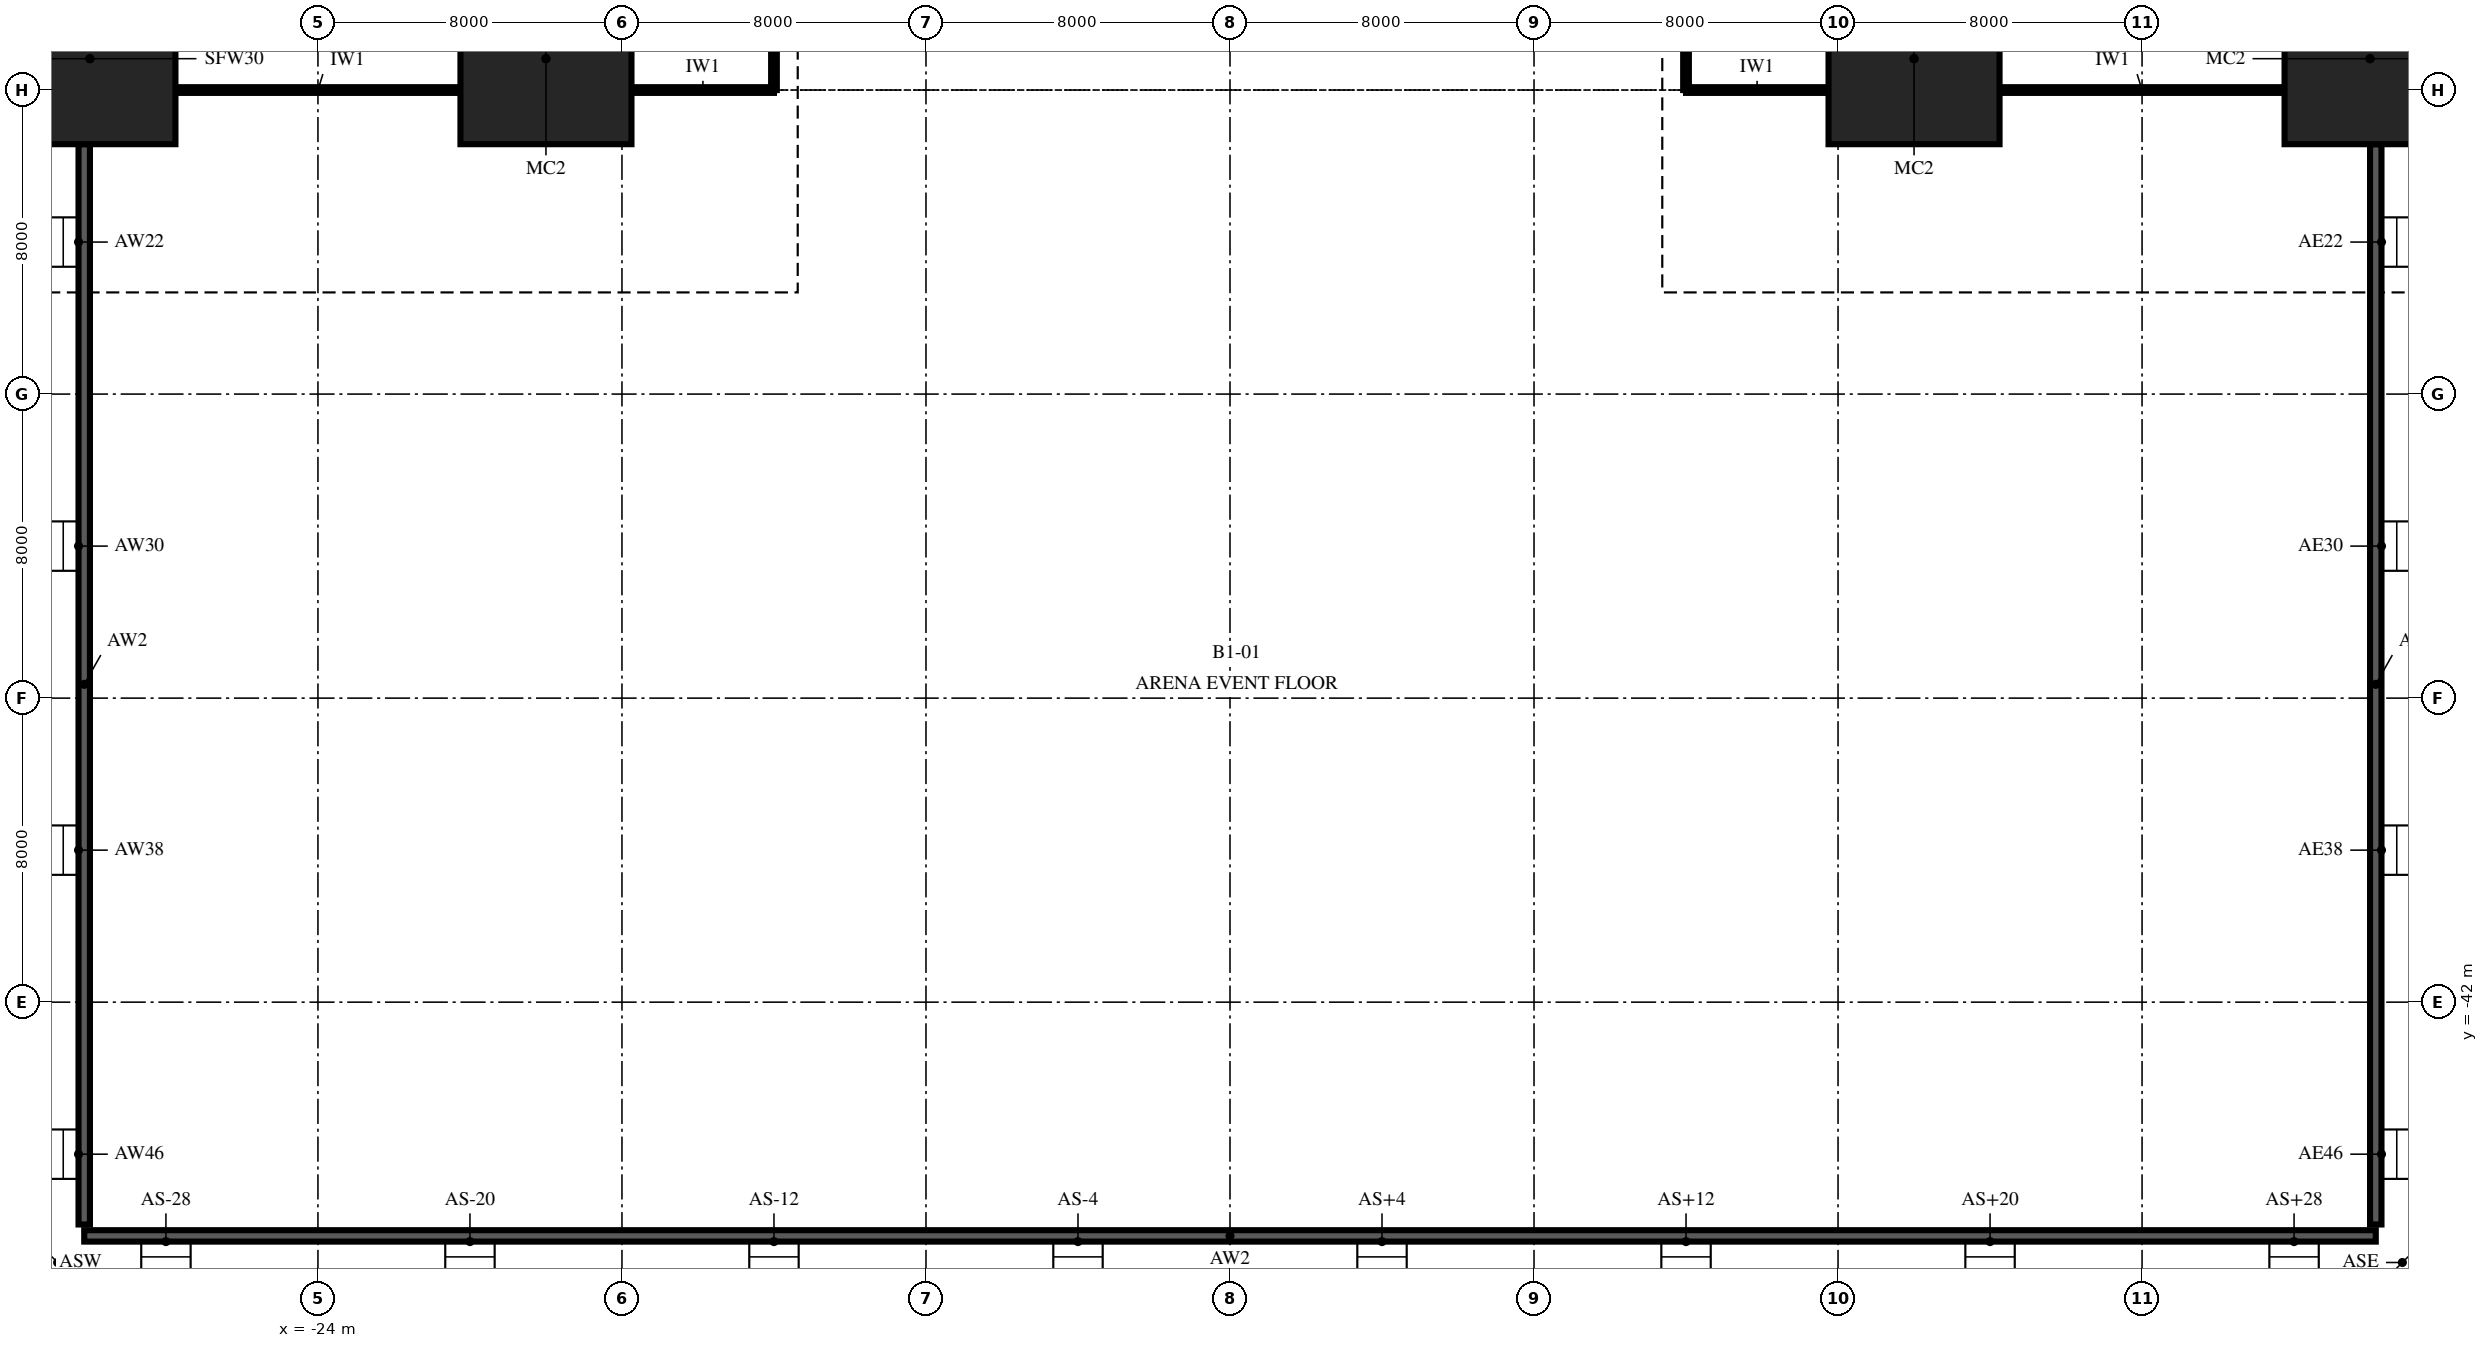
"""IFC4 building model, lengths in metres.
Left out: names, types, materials, properties, quantities, classifications, styles, units other than length and angle.
Written with IfcOpenShell. Run it as: python <this file> out.ifc"""

import sys

from ifc_helpers import new_model, si_unit, direction, frame, frame_2d, origin, origin_2d, place, context, subcontext, project, spatial, rectangle, extrude, element, save


model = new_model("IFC4")
c1 = context("Model", 3, precision=1e-05, world=origin(), true_north=direction((0.0, 1.0)))
c2 = subcontext(c1, "Body", "Model", "MODEL_VIEW")
j1 = project(units=[si_unit("LENGTHUNIT", "METRE"), si_unit("PLANEANGLEUNIT", "RADIAN")], contexts=[c1])
p1 = place(None, origin())
s1 = spatial("IfcSite", under=j1, at=p1, CompositionType="ELEMENT")
p2 = place(p1, origin())
s2 = spatial("IfcBuilding", under=s1, at=p2, CompositionType="ELEMENT")
p3 = place(p2, frame((0.0, 0.0, -7.0)))
s3 = spatial("IfcBuildingStorey", under=s2, at=p3, CompositionType="ELEMENT", Elevation=-7.0)
for number, where, z_axis, x_axis in (
    (1, (-30.0, -17.175, -0.6), (0.0, 0.0, 1.0), (1.0, 0.0, 0.0)),
    (2, (-18.0, -17.175, -0.6), (0.0, 0.0, 1.0), (1.0, 0.0, 0.0)),
    (3, (18.0, -17.175, -0.6), (0.0, 0.0, 1.0), (1.0, 0.0, 0.0)),
    (4, (30.0, -17.175, -0.6), (0.0, 0.0, 1.0), (1.0, 0.0, 0.0)),
):
    element("IfcColumn", number, at=place(p3, frame(where, z_axis=z_axis, x_axis=x_axis)), inside=s3, PredefinedType="COLUMN", context=c2, shape_type="SweptSolid", body=[
        extrude(rectangle(XDim=4.5, YDim=4.5, at=origin_2d()), origin(), (0.0, 0.0, 1.0), 7.6),
    ])
p4 = place(p3, frame((-30.15, -48.15, 0.0), z_axis=(0.0, 0.0, 1.0), x_axis=(1.0, 0.0, 0.0)))
e5 = element("IfcWall", 5, at=p4, inside=s3, PredefinedType="SHEAR", context=c2, shape_type="SweptSolid", body=[
    extrude(rectangle(XDim=60.3, YDim=0.3, at=frame_2d((30.15, 0.0))), origin(), (0.0, 0.0, 1.0), 1.1),
])
for number, where, z_axis, x_axis in (
    (6, (30.15, -47.85, 0.0), (0.0, 0.0, 1.0), (0.0, 1.0, 0.0)),
    (7, (-30.15, -19.425, 0.0), (0.0, 0.0, 1.0), (0.0, -1.0, 0.0)),
):
    element("IfcWall", number, at=place(p3, frame(where, z_axis=z_axis, x_axis=x_axis)), inside=s3, PredefinedType="SHEAR", context=c2, shape_type="SweptSolid", body=[
        extrude(rectangle(XDim=28.425, YDim=0.3, at=frame_2d((14.212, 0.0))), origin(), (0.0, 0.0, 1.0), 1.1),
    ])
p5 = place(p3, frame((-12.0, -18.0, 0.0), z_axis=(0.0, 0.0, 1.0), x_axis=(0.0, 1.0, 0.0)))
e8 = element("IfcWall", 8, at=p5, inside=s3, PredefinedType="PARTITIONING", context=c2, shape_type="SweptSolid", body=[
    extrude(rectangle(XDim=11.6, YDim=0.15, at=frame_2d((5.8, 0.0))), origin(), (0.0, 0.0, 1.0), 6.7),
])
p6 = place(p3, frame((12.0, -18.0, 0.0), z_axis=(0.0, 0.0, 1.0), x_axis=(0.0, 1.0, 0.0)))
e9 = element("IfcWall", 9, at=p6, inside=s3, PredefinedType="PARTITIONING", context=c2, shape_type="SweptSolid", body=[
    extrude(rectangle(XDim=11.6, YDim=0.15, at=frame_2d((5.8, 0.0))), origin(), (0.0, 0.0, 1.0), 6.7),
])
p7 = place(p6, frame((5.3, 0.0, 0.0)))
e10 = element("IfcOpeningElement", 10, at=p7, cuts=e9, PredefinedType="OPENING", context=c2, shape_type="SweptSolid", body=[
    extrude(rectangle(XDim=1.0, YDim=2.1, at=frame_2d((0.5, 1.05))), frame((0.0, 0.09, 0.0), z_axis=(0.0, -1.0, 0.0), x_axis=(1.0, 0.0, 0.0)), (0.0, 0.0, 1.0), 0.18),
])
p8 = place(p3, frame((-27.74, -18.0, 0.0), z_axis=(0.0, 0.0, 1.0), x_axis=(1.0, 0.0, 0.0)))
e11 = element("IfcWall", 11, at=p8, inside=s3, PredefinedType="PARTITIONING", context=c2, shape_type="SweptSolid", body=[
    extrude(rectangle(XDim=7.48, YDim=0.15, at=frame_2d((3.74, 0.0))), origin(), (0.0, 0.0, 1.0), 6.7),
])
for number, where, z_axis, x_axis in (
    (12, (-15.74, -18.0, 0.0), (0.0, 0.0, 1.0), (1.0, 0.0, 0.0)),
    (13, (12.0, -18.0, 0.0), (0.0, 0.0, 1.0), (1.0, 0.0, 0.0)),
):
    element("IfcWall", number, at=place(p3, frame(where, z_axis=z_axis, x_axis=x_axis)), inside=s3, PredefinedType="PARTITIONING", context=c2, shape_type="SweptSolid", body=[
        extrude(rectangle(XDim=3.74, YDim=0.15, at=frame_2d((1.87, 0.0))), origin(), (0.0, 0.0, 1.0), 6.7),
    ])
p9 = place(p3, frame((20.26, -18.0, 0.0), z_axis=(0.0, 0.0, 1.0), x_axis=(1.0, 0.0, 0.0)))
e14 = element("IfcWall", 14, at=p9, inside=s3, PredefinedType="PARTITIONING", context=c2, shape_type="SweptSolid", body=[
    extrude(rectangle(XDim=7.48, YDim=0.15, at=frame_2d((3.74, 0.0))), origin(), (0.0, 0.0, 1.0), 6.7),
])
save(model, sys.argv[1])
